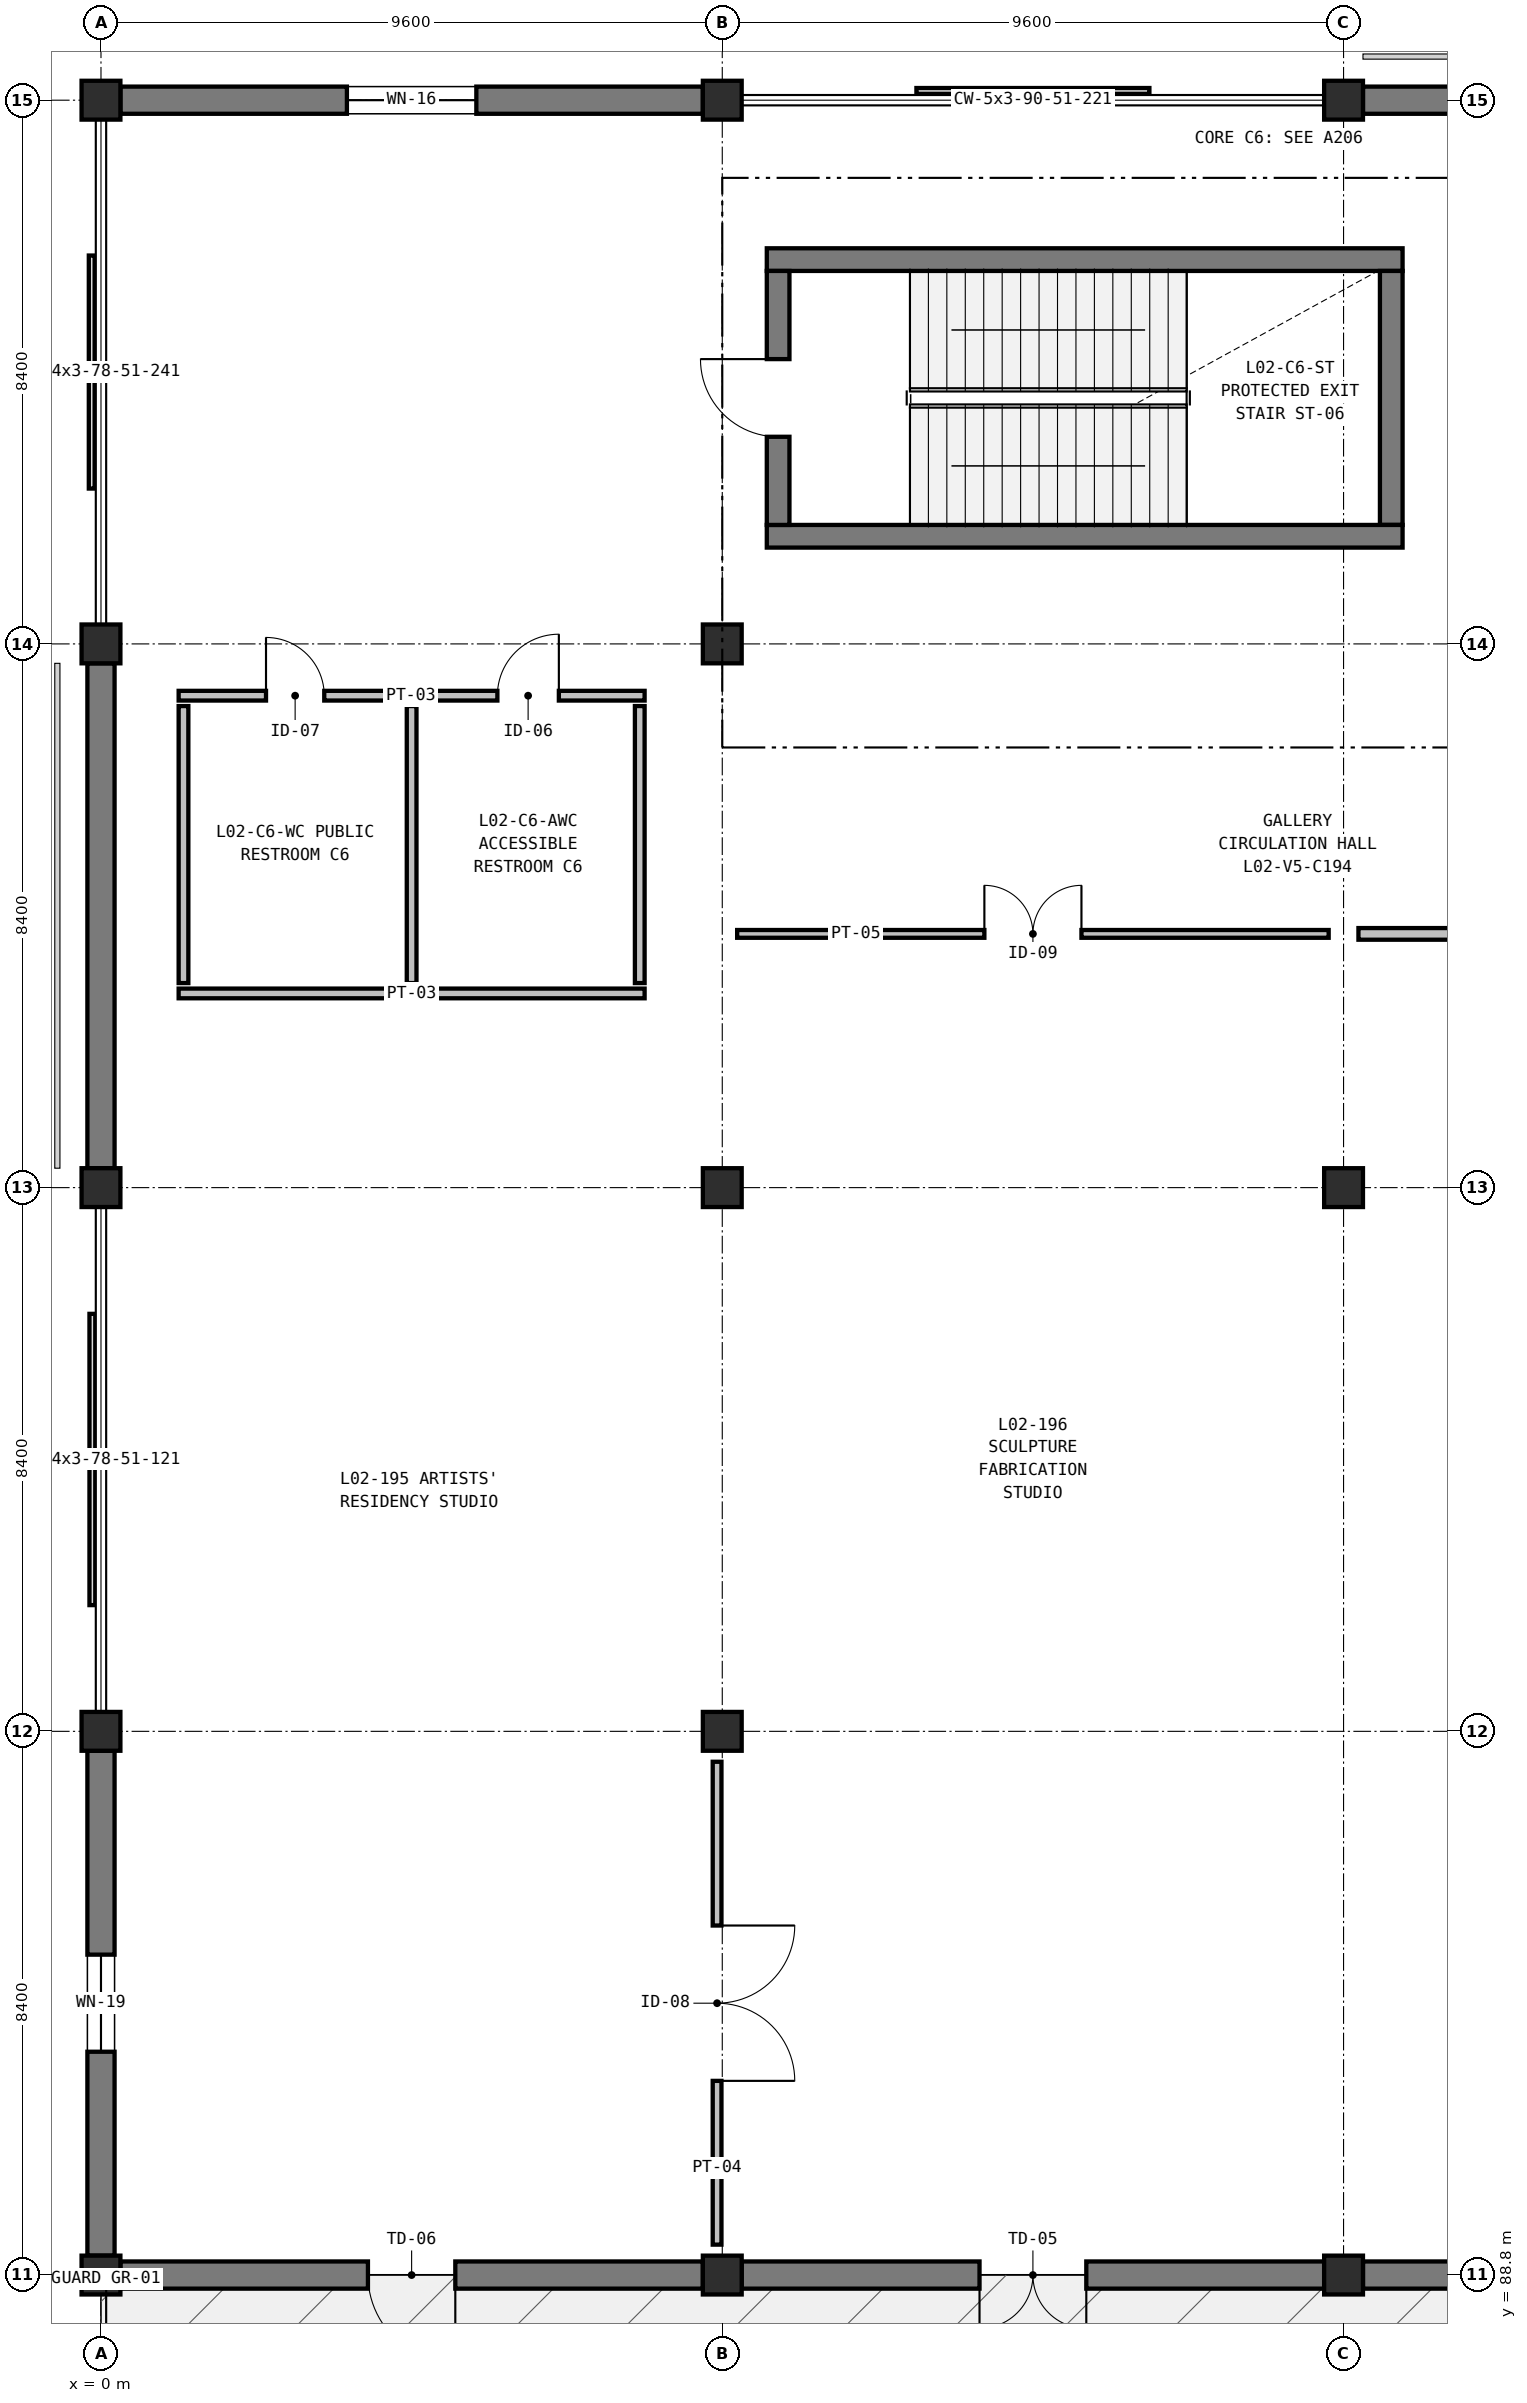
"""IFC4 building model, lengths in metres.
Left out: names, types, materials, properties, quantities, classifications, styles, units other than length and angle.
Written with IfcOpenShell. Run it as: python <this file> out.ifc"""

import sys

from ifc_helpers import new_model, si_unit, direction, frame, frame_2d, origin, origin_2d, place, context, subcontext, project, spatial, rectangle, extrude, element, fill, save


model = new_model("IFC4")
c1 = context("Model", 3, precision=1e-05, world=origin(), true_north=direction((0.0, 1.0)))
c2 = subcontext(c1, "Body", "Model", "MODEL_VIEW")
j1 = project(units=[si_unit("LENGTHUNIT", "METRE"), si_unit("PLANEANGLEUNIT", "RADIAN")], contexts=[c1])
p1 = place(None, origin())
s1 = spatial("IfcSite", under=j1, at=p1, CompositionType="ELEMENT")
p2 = place(p1, origin())
s2 = spatial("IfcBuilding", under=s1, at=p2, CompositionType="ELEMENT")
p3 = place(p2, frame((0.0, 0.0, 11.4)))
s3 = spatial("IfcBuildingStorey", under=s2, at=p3, CompositionType="ELEMENT", Elevation=11.4)
for number, where, z_axis, x_axis in (
    (1, (0.0, 88.8, 0.0), (0.0, 0.0, 1.0), (1.0, 0.0, 0.0)),
    (2, (0.0, 97.2, 0.0), (0.0, 0.0, 1.0), (1.0, 0.0, 0.0)),
    (3, (0.0, 105.6, 0.0), (0.0, 0.0, 1.0), (1.0, 0.0, 0.0)),
    (4, (0.0, 114.0, 0.0), (0.0, 0.0, 1.0), (1.0, 0.0, 0.0)),
    (5, (0.0, 122.4, 0.0), (0.0, 0.0, 1.0), (1.0, 0.0, 0.0)),
    (6, (9.6, 88.8, 0.0), (0.0, 0.0, 1.0), (1.0, 0.0, 0.0)),
    (7, (9.6, 97.2, 0.0), (0.0, 0.0, 1.0), (1.0, 0.0, 0.0)),
    (8, (9.6, 105.6, 0.0), (0.0, 0.0, 1.0), (1.0, 0.0, 0.0)),
    (9, (9.6, 114.0, 0.0), (0.0, 0.0, 1.0), (1.0, 0.0, 0.0)),
    (10, (9.6, 122.4, 0.0), (0.0, 0.0, 1.0), (1.0, 0.0, 0.0)),
    (11, (19.2, 88.8, 0.0), (0.0, 0.0, 1.0), (1.0, 0.0, 0.0)),
    (12, (19.2, 105.6, 0.0), (0.0, 0.0, 1.0), (1.0, 0.0, 0.0)),
    (13, (19.2, 122.4, 0.0), (0.0, 0.0, 1.0), (1.0, 0.0, 0.0)),
):
    element("IfcColumn", number, at=place(p3, frame(where, z_axis=z_axis, x_axis=x_axis)), inside=s3, PredefinedType="COLUMN", context=c2, shape_type="SweptSolid", body=[
        extrude(rectangle(XDim=0.6, YDim=0.6, at=origin_2d()), origin(), (0.0, 0.0, 1.0), 5.4),
    ])
p4 = place(p3, frame((0.3, 122.4, 0.0), z_axis=(0.0, 0.0, 1.0), x_axis=(1.0, 0.0, 0.0)))
e14 = element("IfcWall", 14, at=p4, inside=s3, PredefinedType="SOLIDWALL", context=c2, shape_type="SweptSolid", body=[
    extrude(rectangle(XDim=9.0, YDim=0.42, at=frame_2d((4.5, 0.0))), origin(), (0.0, 0.0, 1.0), 5.1),
])
p5 = place(p4, frame((3.5, 0.0, 0.9)))
e15 = element("IfcOpeningElement", 15, at=p5, cuts=e14, PredefinedType="OPENING", context=c2, shape_type="SweptSolid", body=[
    extrude(rectangle(XDim=2.0, YDim=2.25, at=frame_2d((1.0, 1.125))), frame((0.0, 0.22, 0.0), z_axis=(0.0, -1.0, 0.0), x_axis=(1.0, 0.0, 0.0)), (0.0, 0.0, 1.0), 0.44),
])
p6 = place(p3, frame((19.5, 122.4, 0.0), z_axis=(0.0, 0.0, 1.0), x_axis=(1.0, 0.0, 0.0)))
e16 = element("IfcWall", 16, at=p6, inside=s3, PredefinedType="SOLIDWALL", context=c2, shape_type="SweptSolid", body=[
    extrude(rectangle(XDim=9.0, YDim=0.42, at=frame_2d((4.5, 0.0))), origin(), (0.0, 0.0, 1.0), 5.1),
])
p7 = place(p3, frame((28.5, 88.8, 0.0), z_axis=(0.0, 0.0, 1.0), x_axis=(-1.0, 0.0, 0.0)))
e17 = element("IfcWall", 17, at=p7, inside=s3, PredefinedType="SOLIDWALL", context=c2, shape_type="SweptSolid", body=[
    extrude(rectangle(XDim=9.0, YDim=0.42, at=frame_2d((4.5, 0.0))), origin(), (0.0, 0.0, 1.0), 5.1),
])
p8 = place(p7, frame((3.875, 0.0, 0.0)))
e18 = element("IfcOpeningElement", 18, at=p8, cuts=e17, PredefinedType="OPENING", context=c2, shape_type="SweptSolid", body=[
    extrude(rectangle(XDim=1.25, YDim=2.25, at=frame_2d((0.625, 1.125))), frame((0.0, 0.22, 0.0), z_axis=(0.0, -1.0, 0.0), x_axis=(1.0, 0.0, 0.0)), (0.0, 0.0, 1.0), 0.44),
])
p9 = place(p3, frame((18.9, 88.8, 0.0), z_axis=(0.0, 0.0, 1.0), x_axis=(-1.0, 0.0, 0.0)))
e19 = element("IfcWall", 19, at=p9, inside=s3, PredefinedType="SOLIDWALL", context=c2, shape_type="SweptSolid", body=[
    extrude(rectangle(XDim=9.0, YDim=0.42, at=frame_2d((4.5, 0.0))), origin(), (0.0, 0.0, 1.0), 5.1),
])
p10 = place(p9, frame((3.675, 0.0, 0.0)))
e20 = element("IfcOpeningElement", 20, at=p10, cuts=e19, PredefinedType="OPENING", context=c2, shape_type="SweptSolid", body=[
    extrude(rectangle(XDim=1.65, YDim=2.35, at=frame_2d((0.825, 1.175))), frame((0.0, 0.22, 0.0), z_axis=(0.0, -1.0, 0.0), x_axis=(1.0, 0.0, 0.0)), (0.0, 0.0, 1.0), 0.44),
])
p11 = place(p3, frame((9.3, 88.8, 0.0), z_axis=(0.0, 0.0, 1.0), x_axis=(-1.0, 0.0, 0.0)))
e21 = element("IfcWall", 21, at=p11, inside=s3, PredefinedType="SOLIDWALL", context=c2, shape_type="SweptSolid", body=[
    extrude(rectangle(XDim=9.0, YDim=0.42, at=frame_2d((4.5, 0.0))), origin(), (0.0, 0.0, 1.0), 5.1),
])
p12 = place(p11, frame((3.825, 0.0, 0.0)))
e22 = element("IfcOpeningElement", 22, at=p12, cuts=e21, PredefinedType="OPENING", context=c2, shape_type="SweptSolid", body=[
    extrude(rectangle(XDim=1.35, YDim=2.2, at=frame_2d((0.675, 1.1))), frame((0.0, 0.22, 0.0), z_axis=(0.0, -1.0, 0.0), x_axis=(1.0, 0.0, 0.0)), (0.0, 0.0, 1.0), 0.44),
])
p13 = place(p3, frame((0.0, 89.1, 0.0), z_axis=(0.0, 0.0, 1.0), x_axis=(0.0, 1.0, 0.0)))
e23 = element("IfcWall", 23, at=p13, inside=s3, PredefinedType="SOLIDWALL", context=c2, shape_type="SweptSolid", body=[
    extrude(rectangle(XDim=7.8, YDim=0.42, at=frame_2d((3.9, 0.0))), origin(), (0.0, 0.0, 1.0), 5.1),
])
p14 = place(p13, frame((3.15, 0.0, 0.9)))
e24 = element("IfcOpeningElement", 24, at=p14, cuts=e23, PredefinedType="OPENING", context=c2, shape_type="SweptSolid", body=[
    extrude(rectangle(XDim=1.5, YDim=1.65, at=frame_2d((0.75, 0.825))), frame((0.0, 0.22, 0.0), z_axis=(0.0, -1.0, 0.0), x_axis=(1.0, 0.0, 0.0)), (0.0, 0.0, 1.0), 0.44),
])
p15 = place(p3, frame((0.0, 105.9, 0.0), z_axis=(0.0, 0.0, 1.0), x_axis=(0.0, 1.0, 0.0)))
e25 = element("IfcWall", 25, at=p15, inside=s3, PredefinedType="SOLIDWALL", context=c2, shape_type="SweptSolid", body=[
    extrude(rectangle(XDim=7.8, YDim=0.42, at=frame_2d((3.9, 0.0))), origin(), (0.0, 0.0, 1.0), 5.1),
])
p16 = place(p3, frame((10.288, 119.937, 0.0), z_axis=(0.0, 0.0, 1.0), x_axis=(1.0, 0.0, 0.0)))
e26 = element("IfcWall", 26, at=p16, inside=s3, PredefinedType="SHEAR", context=c2, shape_type="SweptSolid", body=[
    extrude(rectangle(XDim=9.824, YDim=0.35, at=frame_2d((4.912, 0.0))), origin(), (0.0, 0.0, 1.0), 5.1),
])
p17 = place(p3, frame((19.937, 119.762, 0.0), z_axis=(0.0, 0.0, 1.0), x_axis=(0.0, -1.0, 0.0)))
e27 = element("IfcWall", 27, at=p17, inside=s3, PredefinedType="SHEAR", context=c2, shape_type="SweptSolid", body=[
    extrude(rectangle(XDim=3.924, YDim=0.35, at=frame_2d((1.962, 0.0))), origin(), (0.0, 0.0, 1.0), 5.1),
])
p18 = place(p3, frame((20.112, 115.663, 0.0), z_axis=(0.0, 0.0, 1.0), x_axis=(-1.0, 0.0, 0.0)))
e28 = element("IfcWall", 28, at=p18, inside=s3, PredefinedType="SHEAR", context=c2, shape_type="SweptSolid", body=[
    extrude(rectangle(XDim=9.824, YDim=0.35, at=frame_2d((4.912, 0.0))), origin(), (0.0, 0.0, 1.0), 5.1),
])
p19 = place(p3, frame((10.463, 115.838, 0.0), z_axis=(0.0, 0.0, 1.0), x_axis=(0.0, 1.0, 0.0)))
e29 = element("IfcWall", 29, at=p19, inside=s3, PredefinedType="SHEAR", context=c2, shape_type="SweptSolid", body=[
    extrude(rectangle(XDim=3.924, YDim=0.35, at=frame_2d((1.962, 0.0))), origin(), (0.0, 0.0, 1.0), 5.1),
])
p20 = place(p19, frame((1.362, 0.0, 0.0)))
e30 = element("IfcOpeningElement", 30, at=p20, cuts=e29, PredefinedType="OPENING", context=c2, shape_type="SweptSolid", body=[
    extrude(rectangle(XDim=1.2, YDim=2.2, at=frame_2d((0.6, 1.1))), frame((0.0, 0.185, 0.0), z_axis=(0.0, -1.0, 0.0), x_axis=(1.0, 0.0, 0.0)), (0.0, 0.0, 1.0), 0.37),
])
p21 = place(p3, frame((1.2, 113.2, 0.0), z_axis=(0.0, 0.0, 1.0), x_axis=(1.0, 0.0, 0.0)))
e31 = element("IfcWall", 31, at=p21, inside=s3, PredefinedType="PARTITIONING", context=c2, shape_type="SweptSolid", body=[
    extrude(rectangle(XDim=7.2, YDim=0.15, at=frame_2d((3.6, 0.0))), origin(), (0.0, 0.0, 1.0), 5.1),
])
p22 = place(p21, frame((1.35, 0.0, 0.0)))
e32 = element("IfcOpeningElement", 32, at=p22, cuts=e31, PredefinedType="OPENING", context=c2, shape_type="SweptSolid", body=[
    extrude(rectangle(XDim=0.9, YDim=2.1, at=frame_2d((0.45, 1.05))), frame((0.0, 0.085, 0.0), z_axis=(0.0, -1.0, 0.0), x_axis=(1.0, 0.0, 0.0)), (0.0, 0.0, 1.0), 0.17),
])
p23 = place(p21, frame((4.925, 0.0, 0.0)))
e33 = element("IfcOpeningElement", 33, at=p23, cuts=e31, PredefinedType="OPENING", context=c2, shape_type="SweptSolid", body=[
    extrude(rectangle(XDim=0.95, YDim=2.15, at=frame_2d((0.475, 1.075))), frame((0.0, 0.085, 0.0), z_axis=(0.0, -1.0, 0.0), x_axis=(1.0, 0.0, 0.0)), (0.0, 0.0, 1.0), 0.17),
])
p24 = place(p3, frame((1.2, 108.6, 0.0), z_axis=(0.0, 0.0, 1.0), x_axis=(1.0, 0.0, 0.0)))
e34 = element("IfcWall", 34, at=p24, inside=s3, PredefinedType="PARTITIONING", context=c2, shape_type="SweptSolid", body=[
    extrude(rectangle(XDim=7.2, YDim=0.15, at=frame_2d((3.6, 0.0))), origin(), (0.0, 0.0, 1.0), 5.1),
])
for number, where, z_axis, x_axis in (
    (35, (1.275, 108.76, 0.0), (0.0, 0.0, 1.0), (0.0, 1.0, 0.0)),
    (36, (4.8, 108.76, 0.0), (0.0, 0.0, 1.0), (0.0, 1.0, 0.0)),
    (37, (8.325, 108.76, 0.0), (0.0, 0.0, 1.0), (0.0, 1.0, 0.0)),
):
    element("IfcWall", number, at=place(p3, frame(where, z_axis=z_axis, x_axis=x_axis)), inside=s3, PredefinedType="PARTITIONING", context=c2, shape_type="SweptSolid", body=[
        extrude(rectangle(XDim=4.28, YDim=0.15, at=frame_2d((2.14, 0.0))), origin(), (0.0, 0.0, 1.0), 4.475),
    ])
p25 = place(p3, frame((9.52, 96.73, 0.0), z_axis=(0.0, 0.0, 1.0), x_axis=(0.0, -1.0, 0.0)))
e38 = element("IfcWall", 38, at=p25, inside=s3, PredefinedType="PARTITIONING", context=c2, shape_type="SweptSolid", body=[
    extrude(rectangle(XDim=7.46, YDim=0.135, at=frame_2d((3.73, 0.0))), origin(), (0.0, 0.0, 1.0), 4.375),
])
p26 = place(p25, frame((2.53, 0.0, 0.0)))
e39 = element("IfcOpeningElement", 39, at=p26, cuts=e38, PredefinedType="OPENING", context=c2, shape_type="SweptSolid", body=[
    extrude(rectangle(XDim=2.4, YDim=2.6, at=frame_2d((1.2, 1.3))), frame((0.0, 0.077, 0.0), z_axis=(0.0, -1.0, 0.0), x_axis=(1.0, 0.0, 0.0)), (0.0, 0.0, 1.0), 0.155),
])
p27 = place(p3, frame((9.83, 109.52, 0.0), z_axis=(0.0, 0.0, 1.0), x_axis=(1.0, 0.0, 0.0)))
e40 = element("IfcWall", 40, at=p27, inside=s3, PredefinedType="PARTITIONING", context=c2, shape_type="SweptSolid", body=[
    extrude(rectangle(XDim=9.14, YDim=0.12, at=frame_2d((4.57, 0.0))), origin(), (0.0, 0.0, 1.0), 4.375),
])
p28 = place(p27, frame((3.82, 0.0, 0.0)))
e41 = element("IfcOpeningElement", 41, at=p28, cuts=e40, PredefinedType="OPENING", context=c2, shape_type="SweptSolid", body=[
    extrude(rectangle(XDim=1.5, YDim=2.3, at=frame_2d((0.75, 1.15))), frame((0.0, 0.07, 0.0), z_axis=(0.0, -1.0, 0.0), x_axis=(1.0, 0.0, 0.0)), (0.0, 0.0, 1.0), 0.14),
])
p29 = place(p3, frame((19.43, 109.52, 0.0), z_axis=(0.0, 0.0, 1.0), x_axis=(1.0, 0.0, 0.0)))
e42 = element("IfcWall", 42, at=p29, inside=s3, PredefinedType="PARTITIONING", context=c2, shape_type="SweptSolid", body=[
    extrude(rectangle(XDim=8.82, YDim=0.18, at=frame_2d((4.41, 0.0))), origin(), (0.0, 0.0, 1.0), 5.1),
])
p30 = place(p29, frame((3.835, 0.0, 0.0)))
e43 = element("IfcOpeningElement", 43, at=p30, cuts=e42, PredefinedType="OPENING", context=c2, shape_type="SweptSolid", body=[
    extrude(rectangle(XDim=1.15, YDim=2.2, at=frame_2d((0.575, 1.1))), frame((0.0, 0.1, 0.0), z_axis=(0.0, -1.0, 0.0), x_axis=(1.0, 0.0, 0.0)), (0.0, 0.0, 1.0), 0.2),
])
p31 = place(p5, origin())
e44 = element("IfcWindow", 44, at=p31, inside=s3, PartitioningType="SINGLE_PANEL", PredefinedType="WINDOW", context=c2, shape_type="SweptSolid", body=[
    extrude(rectangle(XDim=2.0, YDim=2.25, at=frame_2d((1.0, 1.125))), frame((0.0, 0.03, 0.0), z_axis=(0.0, -1.0, 0.0), x_axis=(1.0, 0.0, 0.0)), (0.0, 0.0, 1.0), 0.06),
])
fill(e15, e44)
p32 = place(p10, origin())
e45 = element("IfcDoor", 45, at=p32, inside=s3, OperationType="DOUBLE_DOOR_SINGLE_SWING", PredefinedType="DOOR", context=c2, shape_type="SweptSolid", body=[
    extrude(rectangle(XDim=1.65, YDim=2.35, at=frame_2d((0.825, 1.175))), frame((0.0, 0.025, 0.0), z_axis=(0.0, -1.0, 0.0), x_axis=(1.0, 0.0, 0.0)), (0.0, 0.0, 1.0), 0.05),
])
fill(e20, e45)
p33 = place(p12, origin())
e46 = element("IfcDoor", 46, at=p33, inside=s3, OperationType="SINGLE_SWING_LEFT", PredefinedType="DOOR", context=c2, shape_type="SweptSolid", body=[
    extrude(rectangle(XDim=1.35, YDim=2.2, at=frame_2d((0.675, 1.1))), frame((0.0, 0.025, 0.0), z_axis=(0.0, -1.0, 0.0), x_axis=(1.0, 0.0, 0.0)), (0.0, 0.0, 1.0), 0.05),
])
fill(e22, e46)
p34 = place(p14, origin())
e47 = element("IfcWindow", 47, at=p34, inside=s3, PartitioningType="SINGLE_PANEL", PredefinedType="WINDOW", context=c2, shape_type="SweptSolid", body=[
    extrude(rectangle(XDim=1.5, YDim=1.65, at=frame_2d((0.75, 0.825))), frame((0.0, 0.03, 0.0), z_axis=(0.0, -1.0, 0.0), x_axis=(1.0, 0.0, 0.0)), (0.0, 0.0, 1.0), 0.06),
])
fill(e24, e47)
p35 = place(p20, origin())
e48 = element("IfcDoor", 48, at=p35, inside=s3, OperationType="SINGLE_SWING_RIGHT", PredefinedType="DOOR", context=c2, shape_type="SweptSolid", body=[
    extrude(rectangle(XDim=1.2, YDim=2.2, at=frame_2d((0.6, 1.1))), frame((0.0, 0.025, 0.0), z_axis=(0.0, -1.0, 0.0), x_axis=(1.0, 0.0, 0.0)), (0.0, 0.0, 1.0), 0.05),
])
fill(e30, e48)
p36 = place(p22, origin())
e49 = element("IfcDoor", 49, at=p36, inside=s3, OperationType="SINGLE_SWING_LEFT", PredefinedType="DOOR", context=c2, shape_type="SweptSolid", body=[
    extrude(rectangle(XDim=0.9, YDim=2.1, at=frame_2d((0.45, 1.05))), frame((0.0, 0.025, 0.0), z_axis=(0.0, -1.0, 0.0), x_axis=(1.0, 0.0, 0.0)), (0.0, 0.0, 1.0), 0.05),
])
fill(e32, e49)
p37 = place(p23, origin())
e50 = element("IfcDoor", 50, at=p37, inside=s3, OperationType="SINGLE_SWING_RIGHT", PredefinedType="DOOR", context=c2, shape_type="SweptSolid", body=[
    extrude(rectangle(XDim=0.95, YDim=2.15, at=frame_2d((0.475, 1.075))), frame((0.0, 0.025, 0.0), z_axis=(0.0, -1.0, 0.0), x_axis=(1.0, 0.0, 0.0)), (0.0, 0.0, 1.0), 0.05),
])
fill(e33, e50)
p38 = place(p26, origin())
e51 = element("IfcDoor", 51, at=p38, inside=s3, OperationType="DOUBLE_DOOR_SINGLE_SWING", PredefinedType="DOOR", context=c2, shape_type="SweptSolid", body=[
    extrude(rectangle(XDim=2.4, YDim=2.6, at=frame_2d((1.2, 1.3))), frame((0.0, 0.025, 0.0), z_axis=(0.0, -1.0, 0.0), x_axis=(1.0, 0.0, 0.0)), (0.0, 0.0, 1.0), 0.05),
])
fill(e39, e51)
p39 = place(p28, origin())
e52 = element("IfcDoor", 52, at=p39, inside=s3, OperationType="DOUBLE_DOOR_SINGLE_SWING", PredefinedType="DOOR", context=c2, shape_type="SweptSolid", body=[
    extrude(rectangle(XDim=1.5, YDim=2.3, at=frame_2d((0.75, 1.15))), frame((0.0, 0.025, 0.0), z_axis=(0.0, -1.0, 0.0), x_axis=(1.0, 0.0, 0.0)), (0.0, 0.0, 1.0), 0.05),
])
fill(e41, e52)
save(model, sys.argv[1])
